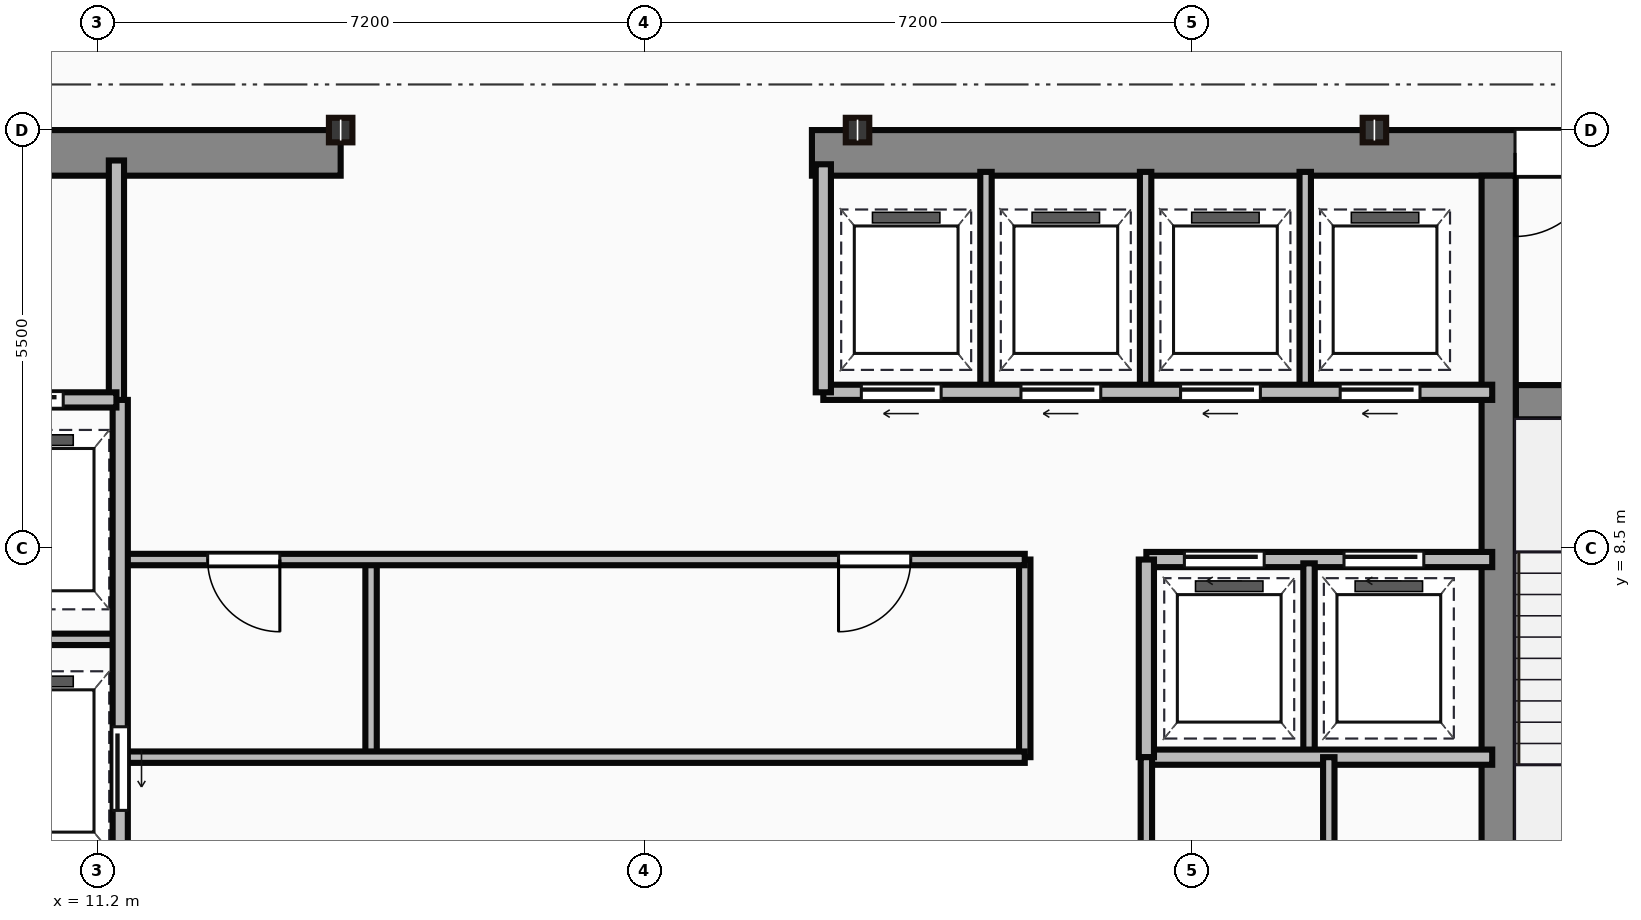
"""IFC4 building model, lengths in metres.
Left out: names, types, materials, properties, quantities, classifications, styles, units other than length and angle.
Written with IfcOpenShell. Run it as: python <this file> out.ifc"""

import sys

from ifc_helpers import new_model, si_unit, direction, frame, frame_2d, origin, origin_2d, place, context, subcontext, project, spatial, rectangle, i_section, extrude, source, transform, mapped, element, fill, save


model = new_model("IFC4")
c1 = context("Model", 3, precision=1e-05, world=origin(), true_north=direction((0.0, 1.0)))
c2 = subcontext(c1, "Body", "Model", "MODEL_VIEW")
j1 = project(units=[si_unit("LENGTHUNIT", "METRE"), si_unit("PLANEANGLEUNIT", "RADIAN")], contexts=[c1])
p1 = place(None, origin())
s1 = spatial("IfcSite", under=j1, at=p1, CompositionType="ELEMENT")
p2 = place(p1, origin())
s2 = spatial("IfcBuilding", under=s1, at=p2, CompositionType="ELEMENT")
p3 = place(p2, frame((0.0, 0.0, 221.45)))
s3 = spatial("IfcBuildingStorey", under=s2, at=p3, CompositionType="ELEMENT", Elevation=221.45)
m1 = source(origin(), c2, "Body", "SweptSolid", [
    extrude(rectangle(XDim=9.1, YDim=0.6, at=frame_2d((4.55, 0.0))), origin(), (0.0, 0.0, 1.0), 3.65),
])
p4 = place(p3, frame((5.3, 13.7, 0.0), z_axis=(0.0, 0.0, 1.0), x_axis=(1.0, 0.0, 0.0)))
e1 = element("IfcWall", 1, at=p4, inside=s3, PredefinedType="SHEAR", context=c2, shape_type="MappedRepresentation", body=[
    mapped(m1, transform((0.0, 0.0, 0.0))),
])
p5 = place(p4, frame((4.1, 0.0, 0.0)))
e2 = element("IfcOpeningElement", 2, at=p5, cuts=e1, PredefinedType="OPENING", context=c2, shape_type="SweptSolid", body=[
    extrude(rectangle(XDim=1.1, YDim=2.15, at=frame_2d((0.55, 1.075))), frame((0.0, 0.31, 0.0), z_axis=(0.0, -1.0, 0.0), x_axis=(1.0, 0.0, 0.0)), (0.0, 0.0, 1.0), 0.62),
])
m2 = source(origin(), c2, "Body", "SweptSolid", [
    extrude(rectangle(XDim=12.6, YDim=0.6, at=frame_2d((6.3, 0.0))), origin(), (0.0, 0.0, 1.0), 3.65),
])
p6 = place(p3, frame((20.6, 13.7, 0.0), z_axis=(0.0, 0.0, 1.0), x_axis=(1.0, 0.0, 0.0)))
e3 = element("IfcWall", 3, at=p6, inside=s3, PredefinedType="SHEAR", context=c2, shape_type="MappedRepresentation", body=[
    mapped(m2, transform((0.0, 0.0, 0.0))),
])
p7 = place(p6, frame((9.25, 0.0, 0.0)))
e4 = element("IfcOpeningElement", 4, at=p7, cuts=e3, PredefinedType="OPENING", context=c2, shape_type="SweptSolid", body=[
    extrude(rectangle(XDim=1.1, YDim=2.15, at=frame_2d((0.55, 1.075))), frame((0.0, 0.31, 0.0), z_axis=(0.0, -1.0, 0.0), x_axis=(1.0, 0.0, 0.0)), (0.0, 0.0, 1.0), 0.62),
])
m3 = source(origin(), c2, "Body", "SweptSolid", [
    extrude(rectangle(XDim=12.5, YDim=0.45, at=frame_2d((6.25, 0.0))), origin(), (0.0, 0.0, 1.0), 3.65),
])
p8 = place(p3, frame((29.635, 0.9, 0.0), z_axis=(0.0, 0.0, 1.0), x_axis=(0.0, 1.0, 0.0)))
e5 = element("IfcWall", 5, at=p8, inside=s3, PredefinedType="SHEAR", context=c2, shape_type="MappedRepresentation", body=[
    mapped(m3, transform((0.0, 0.0, 0.0))),
])
m4 = source(origin(), c2, "Body", "SweptSolid", [
    extrude(rectangle(XDim=3.39, YDim=0.45, at=frame_2d((1.695, 0.0))), origin(), (0.0, 0.0, 1.0), 3.65),
])
p9 = place(p3, frame((29.86, 10.42, 0.0), z_axis=(0.0, 0.0, 1.0), x_axis=(1.0, 0.0, 0.0)))
e6 = element("IfcWall", 6, at=p9, inside=s3, PredefinedType="SHEAR", context=c2, shape_type="MappedRepresentation", body=[
    mapped(m4, transform((0.0, 0.0, 0.0))),
])
p10 = place(p9, frame((1.1, 0.0, 0.0)))
e7 = element("IfcOpeningElement", 7, at=p10, cuts=e6, PredefinedType="OPENING", context=c2, shape_type="SweptSolid", body=[
    extrude(rectangle(XDim=1.1, YDim=2.15, at=frame_2d((0.55, 1.075))), frame((0.0, 0.235, 0.0), z_axis=(0.0, -1.0, 0.0), x_axis=(1.0, 0.0, 0.0)), (0.0, 0.0, 1.0), 0.47),
])
m5 = source(origin(), c2, "Body", "SweptSolid", [
    extrude(i_section(OverallWidth=0.309, OverallDepth=0.323, WebThickness=0.014, FlangeThickness=0.023, at=origin_2d()), origin(), (0.0, 0.0, 1.0), 3.65),
])
for number, where, z_axis, x_axis in (
    (8, (14.4, 14.0, 0.0), (0.0, 0.0, 1.0), (1.0, 0.0, 0.0)),
    (9, (21.2, 14.0, 0.0), (0.0, 0.0, 1.0), (1.0, 0.0, 0.0)),
    (10, (28.0, 14.0, 0.0), (0.0, 0.0, 1.0), (1.0, 0.0, 0.0)),
):
    element("IfcColumn", number, at=place(p3, frame(where, z_axis=z_axis, x_axis=x_axis)), inside=s3, PredefinedType="COLUMN", context=c2, shape_type="MappedRepresentation", body=[
        mapped(m5, transform((0.0, 0.0, 0.0))),
    ])
m6 = source(origin(), c2, "Body", "SweptSolid", [
    extrude(rectangle(XDim=3.18, YDim=0.2, at=frame_2d((1.59, 0.0))), origin(), (0.0, 0.0, 1.0), 3.4),
])
p11 = place(p3, frame((11.45, 10.42, 0.0), z_axis=(0.0, 0.0, 1.0), x_axis=(0.0, 1.0, 0.0)))
e11 = element("IfcWall", 11, at=p11, inside=s3, PredefinedType="PARTITIONING", context=c2, shape_type="MappedRepresentation", body=[
    mapped(m6, transform((0.0, 0.0, 0.0))),
])
m7 = source(origin(), c2, "Body", "SweptSolid", [
    extrude(rectangle(XDim=2.35, YDim=0.2, at=frame_2d((1.175, 0.0))), origin(), (0.0, 0.0, 1.0), 3.4),
])
p12 = place(p3, frame((9.1, 10.45, 0.0), z_axis=(0.0, 0.0, 1.0), x_axis=(1.0, 0.0, 0.0)))
e12 = element("IfcWall", 12, at=p12, inside=s3, PredefinedType="PARTITIONING", context=c2, shape_type="MappedRepresentation", body=[
    mapped(m7, transform((0.0, 0.0, 0.0))),
])
p13 = place(p12, frame((0.55, 0.0, 0.0)))
e13 = element("IfcOpeningElement", 13, at=p13, cuts=e12, PredefinedType="OPENING", context=c2, shape_type="SweptSolid", body=[
    extrude(rectangle(XDim=1.1, YDim=2.15, at=frame_2d((0.55, 1.075))), frame((0.0, 0.11, 0.0), z_axis=(0.0, -1.0, 0.0), x_axis=(1.0, 0.0, 0.0)), (0.0, 0.0, 1.0), 0.22),
])
m8 = source(origin(), c2, "Body", "SweptSolid", [
    extrude(rectangle(XDim=9.6, YDim=0.2, at=frame_2d((4.8, 0.0))), origin(), (0.0, 0.0, 1.0), 3.4),
])
p14 = place(p3, frame((11.5, 0.85, 0.0), z_axis=(0.0, 0.0, 1.0), x_axis=(0.0, 1.0, 0.0)))
e14 = element("IfcWall", 14, at=p14, inside=s3, PredefinedType="PARTITIONING", context=c2, shape_type="MappedRepresentation", body=[
    mapped(m8, transform((0.0, 0.0, 0.0))),
])
p15 = place(p14, frame((4.2, 0.0, 0.0)))
e15 = element("IfcOpeningElement", 15, at=p15, cuts=e14, PredefinedType="OPENING", context=c2, shape_type="SweptSolid", body=[
    extrude(rectangle(XDim=1.1, YDim=2.15, at=frame_2d((0.55, 1.075))), frame((0.0, 0.11, 0.0), z_axis=(0.0, -1.0, 0.0), x_axis=(1.0, 0.0, 0.0)), (0.0, 0.0, 1.0), 0.22),
])
p16 = place(p14, frame((0.9, 0.0, 0.0)))
e16 = element("IfcOpeningElement", 16, at=p16, cuts=e14, PredefinedType="OPENING", context=c2, shape_type="SweptSolid", body=[
    extrude(rectangle(XDim=1.2, YDim=2.15, at=frame_2d((0.6, 1.075))), frame((0.0, 0.11, 0.0), z_axis=(0.0, -1.0, 0.0), x_axis=(1.0, 0.0, 0.0)), (0.0, 0.0, 1.0), 0.22),
])
m9 = source(origin(), c2, "Body", "SweptSolid", [
    extrude(rectangle(XDim=2.4, YDim=0.15, at=frame_2d((1.2, 0.0))), origin(), (0.0, 0.0, 1.0), 3.4),
])
p17 = place(p3, frame((9.1, 7.3, 0.0), z_axis=(0.0, 0.0, 1.0), x_axis=(1.0, 0.0, 0.0)))
e17 = element("IfcWall", 17, at=p17, inside=s3, PredefinedType="PARTITIONING", context=c2, shape_type="MappedRepresentation", body=[
    mapped(m9, transform((0.0, 0.0, 0.0))),
])
m10 = source(origin(), c2, "Body", "SweptSolid", [
    extrude(rectangle(XDim=11.85, YDim=0.15, at=frame_2d((5.925, 0.0))), origin(), (0.0, 0.0, 1.0), 3.4),
])
p18 = place(p3, frame((11.55, 5.75, 0.0), z_axis=(0.0, 0.0, 1.0), x_axis=(1.0, 0.0, 0.0)))
e18 = element("IfcWall", 18, at=p18, inside=s3, PredefinedType="PARTITIONING", context=c2, shape_type="MappedRepresentation", body=[
    mapped(m10, transform((0.0, 0.0, 0.0))),
])
p19 = place(p3, frame((11.55, 8.35, 0.0), z_axis=(0.0, 0.0, 1.0), x_axis=(1.0, 0.0, 0.0)))
e19 = element("IfcWall", 19, at=p19, inside=s3, PredefinedType="PARTITIONING", context=c2, shape_type="MappedRepresentation", body=[
    mapped(m10, transform((0.0, 0.0, 0.0))),
])
p20 = place(p19, frame((1.1, 0.0, 0.0)))
e20 = element("IfcOpeningElement", 20, at=p20, cuts=e19, PredefinedType="OPENING", context=c2, shape_type="SweptSolid", body=[
    extrude(rectangle(XDim=0.95, YDim=2.15, at=frame_2d((0.475, 1.075))), frame((0.0, 0.085, 0.0), z_axis=(0.0, -1.0, 0.0), x_axis=(1.0, 0.0, 0.0)), (0.0, 0.0, 1.0), 0.17),
])
p21 = place(p19, frame((9.4, 0.0, 0.0)))
e21 = element("IfcOpeningElement", 21, at=p21, cuts=e19, PredefinedType="OPENING", context=c2, shape_type="SweptSolid", body=[
    extrude(rectangle(XDim=0.95, YDim=2.15, at=frame_2d((0.475, 1.075))), frame((0.0, 0.085, 0.0), z_axis=(0.0, -1.0, 0.0), x_axis=(1.0, 0.0, 0.0)), (0.0, 0.0, 1.0), 0.17),
])
m11 = source(origin(), c2, "Body", "SweptSolid", [
    extrude(rectangle(XDim=2.6, YDim=0.15, at=frame_2d((1.3, 0.0))), origin(), (0.0, 0.0, 1.0), 3.4),
])
p22 = place(p3, frame((23.4, 5.75, 0.0), z_axis=(0.0, 0.0, 1.0), x_axis=(0.0, 1.0, 0.0)))
e22 = element("IfcWall", 22, at=p22, inside=s3, PredefinedType="PARTITIONING", context=c2, shape_type="MappedRepresentation", body=[
    mapped(m11, transform((0.0, 0.0, 0.0))),
])
m12 = source(origin(), c2, "Body", "SweptSolid", [
    extrude(rectangle(XDim=2.5, YDim=0.15, at=frame_2d((1.25, 0.0))), origin(), (0.0, 0.0, 1.0), 3.4),
])
p23 = place(p3, frame((14.8, 5.8, 0.0), z_axis=(0.0, 0.0, 1.0), x_axis=(0.0, 1.0, 0.0)))
e23 = element("IfcWall", 23, at=p23, inside=s3, PredefinedType="PARTITIONING", context=c2, shape_type="MappedRepresentation", body=[
    mapped(m12, transform((0.0, 0.0, 0.0))),
])
m13 = source(origin(), c2, "Body", "SweptSolid", [
    extrude(rectangle(XDim=8.8, YDim=0.2, at=frame_2d((4.4, 0.0))), origin(), (0.0, 0.0, 1.0), 3.4),
])
p24 = place(p3, frame((20.75, 10.55, 0.0), z_axis=(0.0, 0.0, 1.0), x_axis=(1.0, 0.0, 0.0)))
e24 = element("IfcWall", 24, at=p24, inside=s3, PredefinedType="PARTITIONING", context=c2, shape_type="MappedRepresentation", body=[
    mapped(m13, transform((0.0, 0.0, 0.0))),
])
p25 = place(p24, frame((0.5, 0.0, 0.0)))
e25 = element("IfcOpeningElement", 25, at=p25, cuts=e24, PredefinedType="OPENING", context=c2, shape_type="SweptSolid", body=[
    extrude(rectangle(XDim=1.05, YDim=2.15, at=frame_2d((0.525, 1.075))), frame((0.0, 0.11, 0.0), z_axis=(0.0, -1.0, 0.0), x_axis=(1.0, 0.0, 0.0)), (0.0, 0.0, 1.0), 0.22),
])
p26 = place(p24, frame((2.6, 0.0, 0.0)))
e26 = element("IfcOpeningElement", 26, at=p26, cuts=e24, PredefinedType="OPENING", context=c2, shape_type="SweptSolid", body=[
    extrude(rectangle(XDim=1.05, YDim=2.15, at=frame_2d((0.525, 1.075))), frame((0.0, 0.11, 0.0), z_axis=(0.0, -1.0, 0.0), x_axis=(1.0, 0.0, 0.0)), (0.0, 0.0, 1.0), 0.22),
])
p27 = place(p24, frame((4.7, 0.0, 0.0)))
e27 = element("IfcOpeningElement", 27, at=p27, cuts=e24, PredefinedType="OPENING", context=c2, shape_type="SweptSolid", body=[
    extrude(rectangle(XDim=1.05, YDim=2.15, at=frame_2d((0.525, 1.075))), frame((0.0, 0.11, 0.0), z_axis=(0.0, -1.0, 0.0), x_axis=(1.0, 0.0, 0.0)), (0.0, 0.0, 1.0), 0.22),
])
p28 = place(p24, frame((6.8, 0.0, 0.0)))
e28 = element("IfcOpeningElement", 28, at=p28, cuts=e24, PredefinedType="OPENING", context=c2, shape_type="SweptSolid", body=[
    extrude(rectangle(XDim=1.05, YDim=2.15, at=frame_2d((0.525, 1.075))), frame((0.0, 0.11, 0.0), z_axis=(0.0, -1.0, 0.0), x_axis=(1.0, 0.0, 0.0)), (0.0, 0.0, 1.0), 0.22),
])
m14 = source(origin(), c2, "Body", "SweptSolid", [
    extrude(rectangle(XDim=3.0, YDim=0.2, at=frame_2d((1.5, 0.0))), origin(), (0.0, 0.0, 1.0), 3.4),
])
p29 = place(p3, frame((20.75, 10.55, 0.0), z_axis=(0.0, 0.0, 1.0), x_axis=(0.0, 1.0, 0.0)))
e29 = element("IfcWall", 29, at=p29, inside=s3, PredefinedType="PARTITIONING", context=c2, shape_type="MappedRepresentation", body=[
    mapped(m14, transform((0.0, 0.0, 0.0))),
])
m15 = source(origin(), c2, "Body", "SweptSolid", [
    extrude(rectangle(XDim=2.85, YDim=0.15, at=frame_2d((1.425, 0.0))), origin(), (0.0, 0.0, 1.0), 3.4),
])
for number, where, z_axis, x_axis in (
    (30, (22.89, 10.6, 0.0), (0.0, 0.0, 1.0), (0.0, 1.0, 0.0)),
    (31, (24.99, 10.6, 0.0), (0.0, 0.0, 1.0), (0.0, 1.0, 0.0)),
    (32, (27.09, 10.6, 0.0), (0.0, 0.0, 1.0), (0.0, 1.0, 0.0)),
):
    element("IfcWall", number, at=place(p3, frame(where, z_axis=z_axis, x_axis=x_axis)), inside=s3, PredefinedType="PARTITIONING", context=c2, shape_type="MappedRepresentation", body=[
        mapped(m15, transform((0.0, 0.0, 0.0))),
    ])
m16 = source(origin(), c2, "Body", "SweptSolid", [
    extrude(rectangle(XDim=4.55, YDim=0.2, at=frame_2d((2.275, 0.0))), origin(), (0.0, 0.0, 1.0), 3.4),
])
p30 = place(p3, frame((25.0, 8.35, 0.0), z_axis=(0.0, 0.0, 1.0), x_axis=(1.0, 0.0, 0.0)))
e33 = element("IfcWall", 33, at=p30, inside=s3, PredefinedType="PARTITIONING", context=c2, shape_type="MappedRepresentation", body=[
    mapped(m16, transform((0.0, 0.0, 0.0))),
])
p31 = place(p30, frame((0.5, 0.0, 0.0)))
e34 = element("IfcOpeningElement", 34, at=p31, cuts=e33, PredefinedType="OPENING", context=c2, shape_type="SweptSolid", body=[
    extrude(rectangle(XDim=1.05, YDim=2.15, at=frame_2d((0.525, 1.075))), frame((0.0, 0.11, 0.0), z_axis=(0.0, -1.0, 0.0), x_axis=(1.0, 0.0, 0.0)), (0.0, 0.0, 1.0), 0.22),
])
p32 = place(p30, frame((2.6, 0.0, 0.0)))
e35 = element("IfcOpeningElement", 35, at=p32, cuts=e33, PredefinedType="OPENING", context=c2, shape_type="SweptSolid", body=[
    extrude(rectangle(XDim=1.05, YDim=2.15, at=frame_2d((0.525, 1.075))), frame((0.0, 0.11, 0.0), z_axis=(0.0, -1.0, 0.0), x_axis=(1.0, 0.0, 0.0)), (0.0, 0.0, 1.0), 0.22),
])
p33 = place(p3, frame((25.0, 5.75, 0.0), z_axis=(0.0, 0.0, 1.0), x_axis=(1.0, 0.0, 0.0)))
e36 = element("IfcWall", 36, at=p33, inside=s3, PredefinedType="PARTITIONING", context=c2, shape_type="MappedRepresentation", body=[
    mapped(m16, transform((0.0, 0.0, 0.0))),
])
m17 = source(origin(), c2, "Body", "SweptSolid", [
    extrude(rectangle(XDim=2.6, YDim=0.2, at=frame_2d((1.3, 0.0))), origin(), (0.0, 0.0, 1.0), 3.4),
])
p34 = place(p3, frame((25.0, 5.75, 0.0), z_axis=(0.0, 0.0, 1.0), x_axis=(0.0, 1.0, 0.0)))
e37 = element("IfcWall", 37, at=p34, inside=s3, PredefinedType="PARTITIONING", context=c2, shape_type="MappedRepresentation", body=[
    mapped(m17, transform((0.0, 0.0, 0.0))),
])
p35 = place(p3, frame((27.14, 5.8, 0.0), z_axis=(0.0, 0.0, 1.0), x_axis=(0.0, 1.0, 0.0)))
e38 = element("IfcWall", 38, at=p35, inside=s3, PredefinedType="PARTITIONING", context=c2, shape_type="MappedRepresentation", body=[
    mapped(m12, transform((0.0, 0.0, 0.0))),
])
m18 = source(origin(), c2, "Body", "SweptSolid", [
    extrude(rectangle(XDim=4.9, YDim=0.15, at=frame_2d((2.45, 0.0))), origin(), (0.0, 0.0, 1.0), 3.4),
])
p36 = place(p3, frame((25.0, 0.85, 0.0), z_axis=(0.0, 0.0, 1.0), x_axis=(0.0, 1.0, 0.0)))
e39 = element("IfcWall", 39, at=p36, inside=s3, PredefinedType="PARTITIONING", context=c2, shape_type="MappedRepresentation", body=[
    mapped(m18, transform((0.0, 0.0, 0.0))),
])
p37 = place(p36, frame((2.5, 0.0, 0.0)))
e40 = element("IfcOpeningElement", 40, at=p37, cuts=e39, PredefinedType="OPENING", context=c2, shape_type="SweptSolid", body=[
    extrude(rectangle(XDim=0.95, YDim=2.15, at=frame_2d((0.475, 1.075))), frame((0.0, 0.085, 0.0), z_axis=(0.0, -1.0, 0.0), x_axis=(1.0, 0.0, 0.0)), (0.0, 0.0, 1.0), 0.17),
])
m19 = source(origin(), c2, "Body", "SweptSolid", [
    extrude(rectangle(XDim=3.4, YDim=0.15, at=frame_2d((1.7, 0.0))), origin(), (0.0, 0.0, 1.0), 3.4),
])
p38 = place(p3, frame((27.4, 2.35, 0.0), z_axis=(0.0, 0.0, 1.0), x_axis=(0.0, 1.0, 0.0)))
e41 = element("IfcWall", 41, at=p38, inside=s3, PredefinedType="PARTITIONING", context=c2, shape_type="MappedRepresentation", body=[
    mapped(m19, transform((0.0, 0.0, 0.0))),
])
p39 = place(p38, frame((1.1, 0.0, 0.0)))
e42 = element("IfcOpeningElement", 42, at=p39, cuts=e41, PredefinedType="OPENING", context=c2, shape_type="SweptSolid", body=[
    extrude(rectangle(XDim=0.85, YDim=2.1, at=frame_2d((0.425, 1.05))), frame((0.0, 0.085, 0.0), z_axis=(0.0, -1.0, 0.0), x_axis=(1.0, 0.0, 0.0)), (0.0, 0.0, 1.0), 0.17),
])
m20 = source(origin(), c2, "Body", "SweptSolid", [
    extrude(rectangle(XDim=1.1, YDim=2.15, at=frame_2d((0.55, 1.075))), frame((0.0, 0.025, 0.0), z_axis=(0.0, -1.0, 0.0), x_axis=(1.0, 0.0, 0.0)), (0.0, 0.0, 1.0), 0.05),
])
p40 = place(p7, origin())
e43 = element("IfcDoor", 43, at=p40, inside=s3, OperationType="SINGLE_SWING_LEFT", PredefinedType="DOOR", context=c2, shape_type="MappedRepresentation", body=[
    mapped(m20, transform((0.0, 0.0, 0.0))),
])
fill(e4, e43)
p41 = place(p13, origin())
e44 = element("IfcDoor", 44, at=p41, inside=s3, OperationType="SLIDING_TO_LEFT", PredefinedType="DOOR", context=c2, shape_type="MappedRepresentation", body=[
    mapped(m20, transform((0.0, 0.0, 0.0))),
])
fill(e13, e44)
p42 = place(p15, frame((1.1, 0.0, 0.0), z_axis=(0.0, 0.0, 1.0), x_axis=(-1.0, 0.0, 0.0)))
e45 = element("IfcDoor", 45, at=p42, inside=s3, OperationType="SLIDING_TO_LEFT", PredefinedType="DOOR", context=c2, shape_type="MappedRepresentation", body=[
    mapped(m20, transform((0.0, 0.0, 0.0))),
])
fill(e15, e45)
m21 = source(origin(), c2, "Body", "SweptSolid", [
    extrude(rectangle(XDim=0.95, YDim=2.15, at=frame_2d((0.475, 1.075))), frame((0.0, 0.025, 0.0), z_axis=(0.0, -1.0, 0.0), x_axis=(1.0, 0.0, 0.0)), (0.0, 0.0, 1.0), 0.05),
])
p43 = place(p20, origin())
e46 = element("IfcDoor", 46, at=p43, inside=s3, OperationType="SINGLE_SWING_RIGHT", PredefinedType="DOOR", context=c2, shape_type="MappedRepresentation", body=[
    mapped(m21, transform((0.0, 0.0, 0.0))),
])
fill(e20, e46)
p44 = place(p21, origin())
e47 = element("IfcDoor", 47, at=p44, inside=s3, OperationType="SINGLE_SWING_LEFT", PredefinedType="DOOR", context=c2, shape_type="MappedRepresentation", body=[
    mapped(m21, transform((0.0, 0.0, 0.0))),
])
fill(e21, e47)
m22 = source(origin(), c2, "Body", "SweptSolid", [
    extrude(rectangle(XDim=1.05, YDim=2.15, at=frame_2d((0.525, 1.075))), frame((0.0, 0.025, 0.0), z_axis=(0.0, -1.0, 0.0), x_axis=(1.0, 0.0, 0.0)), (0.0, 0.0, 1.0), 0.05),
])
p45 = place(p25, frame((1.05, 0.0, 0.0), z_axis=(0.0, 0.0, 1.0), x_axis=(-1.0, 0.0, 0.0)))
e48 = element("IfcDoor", 48, at=p45, inside=s3, OperationType="SLIDING_TO_LEFT", PredefinedType="DOOR", context=c2, shape_type="MappedRepresentation", body=[
    mapped(m22, transform((0.0, 0.0, 0.0))),
])
fill(e25, e48)
p46 = place(p26, frame((1.05, 0.0, 0.0), z_axis=(0.0, 0.0, 1.0), x_axis=(-1.0, 0.0, 0.0)))
e49 = element("IfcDoor", 49, at=p46, inside=s3, OperationType="SLIDING_TO_LEFT", PredefinedType="DOOR", context=c2, shape_type="MappedRepresentation", body=[
    mapped(m22, transform((0.0, 0.0, 0.0))),
])
fill(e26, e49)
p47 = place(p27, frame((1.05, 0.0, 0.0), z_axis=(0.0, 0.0, 1.0), x_axis=(-1.0, 0.0, 0.0)))
e50 = element("IfcDoor", 50, at=p47, inside=s3, OperationType="SLIDING_TO_LEFT", PredefinedType="DOOR", context=c2, shape_type="MappedRepresentation", body=[
    mapped(m22, transform((0.0, 0.0, 0.0))),
])
fill(e27, e50)
p48 = place(p28, frame((1.05, 0.0, 0.0), z_axis=(0.0, 0.0, 1.0), x_axis=(-1.0, 0.0, 0.0)))
e51 = element("IfcDoor", 51, at=p48, inside=s3, OperationType="SLIDING_TO_LEFT", PredefinedType="DOOR", context=c2, shape_type="MappedRepresentation", body=[
    mapped(m22, transform((0.0, 0.0, 0.0))),
])
fill(e28, e51)
p49 = place(p31, origin())
e52 = element("IfcDoor", 52, at=p49, inside=s3, OperationType="SLIDING_TO_LEFT", PredefinedType="DOOR", context=c2, shape_type="MappedRepresentation", body=[
    mapped(m22, transform((0.0, 0.0, 0.0))),
])
fill(e34, e52)
p50 = place(p32, origin())
e53 = element("IfcDoor", 53, at=p50, inside=s3, OperationType="SLIDING_TO_LEFT", PredefinedType="DOOR", context=c2, shape_type="MappedRepresentation", body=[
    mapped(m22, transform((0.0, 0.0, 0.0))),
])
fill(e35, e53)
save(model, sys.argv[1])
